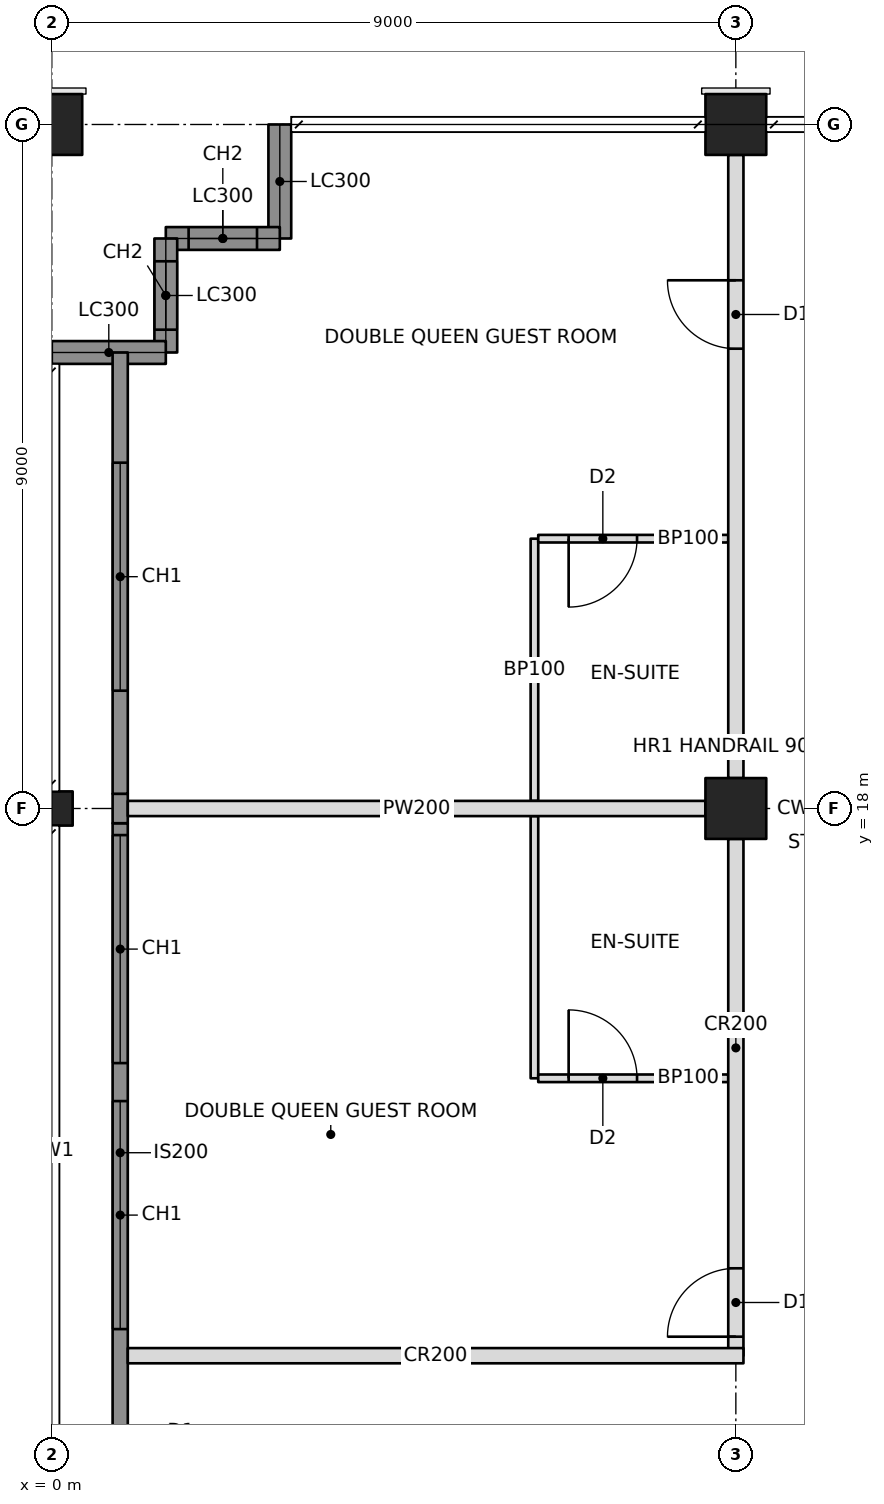
"""IFC4 building model, lengths in metres.
Left out: names, types, materials, properties, quantities, classifications, styles, units other than length and angle.
Written with IfcOpenShell. Run it as: python <this file> out.ifc"""

import sys

from ifc_helpers import new_model, si_unit, direction, frame, frame_2d, origin, origin_2d, place, context, subcontext, project, spatial, rectangle, hollow_rectangle, i_section, extrude, element, fill, save


model = new_model("IFC4")
c1 = context("Model", 3, precision=1e-05, world=origin(), true_north=direction((0.0, 1.0)))
c2 = subcontext(c1, "Body", "Model", "MODEL_VIEW")
j1 = project(units=[si_unit("LENGTHUNIT", "METRE"), si_unit("PLANEANGLEUNIT", "RADIAN")], contexts=[c1])
p1 = place(None, origin())
s1 = spatial("IfcSite", under=j1, at=p1, CompositionType="ELEMENT")
p2 = place(p1, origin())
s2 = spatial("IfcBuilding", under=s1, at=p2, CompositionType="ELEMENT")
p3 = place(p2, frame((0.0, 0.0, 184.2)))
s3 = spatial("IfcBuildingStorey", under=s2, at=p3, CompositionType="ELEMENT", Elevation=184.2)
p4 = place(p3, frame((0.0, 18.0, 0.0), z_axis=(0.0, 0.0, 1.0), x_axis=(0.0, 1.0, 0.0)))
e1 = element("IfcColumn", 1, at=p4, inside=s3, PredefinedType="COLUMN", context=c2, shape_type="SweptSolid", body=[
    extrude(i_section(OverallWidth=0.449, OverallDepth=0.549, WebThickness=0.072, FlangeThickness=0.115, at=origin_2d()), origin(), (0.0, 0.0, 1.0), 3.4),
])
p5 = place(p3, frame((0.0, 27.0, 0.0), z_axis=(0.0, 0.0, 1.0), x_axis=(0.0, 1.0, 0.0)))
e2 = element("IfcColumn", 2, at=p5, inside=s3, PredefinedType="COLUMN", context=c2, shape_type="SweptSolid", body=[
    extrude(hollow_rectangle(XDim=0.8, YDim=0.8, WallThickness=0.07, at=origin_2d()), origin(), (0.0, 0.0, 1.0), 3.4),
])
p6 = place(p3, frame((9.0, 18.0, 0.0), z_axis=(0.0, 0.0, 1.0), x_axis=(1.0, 0.0, 0.0)))
e3 = element("IfcColumn", 3, at=p6, inside=s3, PredefinedType="COLUMN", context=c2, shape_type="SweptSolid", body=[
    extrude(hollow_rectangle(XDim=0.8, YDim=0.8, WallThickness=0.06, at=origin_2d()), origin(), (0.0, 0.0, 1.0), 3.4),
])
p7 = place(p3, frame((9.0, 27.0, 0.0), z_axis=(0.0, 0.0, 1.0), x_axis=(1.0, 0.0, 0.0)))
e4 = element("IfcColumn", 4, at=p7, inside=s3, PredefinedType="COLUMN", context=c2, shape_type="SweptSolid", body=[
    extrude(hollow_rectangle(XDim=0.8, YDim=0.8, WallThickness=0.07, at=origin_2d()), origin(), (0.0, 0.0, 1.0), 3.4),
])
p8 = place(p3, frame((3.0, 27.0, 0.0), z_axis=(0.0, 0.0, 1.0), x_axis=(0.0, -1.0, 0.0)))
e5 = element("IfcWall", 5, at=p8, inside=s3, PredefinedType="SOLIDWALL", context=c2, shape_type="SweptSolid", body=[
    extrude(rectangle(XDim=1.5, YDim=0.3, at=frame_2d((0.75, 0.0))), origin(), (0.0, 0.0, 1.0), 2.42),
])
p9 = place(p3, frame((3.0, 25.5, 0.0), z_axis=(0.0, 0.0, 1.0), x_axis=(-1.0, 0.0, 0.0)))
e6 = element("IfcWall", 6, at=p9, inside=s3, PredefinedType="SOLIDWALL", context=c2, shape_type="SweptSolid", body=[
    extrude(rectangle(XDim=1.5, YDim=0.3, at=frame_2d((0.75, 0.0))), origin(), (0.0, 0.0, 1.0), 3.2),
])
p10 = place(p9, frame((0.3, 0.0, 0.6)))
e7 = element("IfcOpeningElement", 7, at=p10, cuts=e6, PredefinedType="OPENING", context=c2, shape_type="SweptSolid", body=[
    extrude(rectangle(XDim=0.9, YDim=2.2, at=frame_2d((0.45, 1.1))), frame((0.0, 0.16, 0.0), z_axis=(0.0, -1.0, 0.0), x_axis=(1.0, 0.0, 0.0)), (0.0, 0.0, 1.0), 0.32),
])
p11 = place(p3, frame((1.5, 25.5, 0.0), z_axis=(0.0, 0.0, 1.0), x_axis=(0.0, -1.0, 0.0)))
e8 = element("IfcWall", 8, at=p11, inside=s3, PredefinedType="SOLIDWALL", context=c2, shape_type="SweptSolid", body=[
    extrude(rectangle(XDim=1.5, YDim=0.3, at=frame_2d((0.75, 0.0))), origin(), (0.0, 0.0, 1.0), 3.2),
])
p12 = place(p11, frame((0.3, 0.0, 0.6)))
e9 = element("IfcOpeningElement", 9, at=p12, cuts=e8, PredefinedType="OPENING", context=c2, shape_type="SweptSolid", body=[
    extrude(rectangle(XDim=0.9, YDim=2.2, at=frame_2d((0.45, 1.1))), frame((0.0, 0.16, 0.0), z_axis=(0.0, -1.0, 0.0), x_axis=(1.0, 0.0, 0.0)), (0.0, 0.0, 1.0), 0.32),
])
p13 = place(p3, frame((1.5, 24.0, 0.0), z_axis=(0.0, 0.0, 1.0), x_axis=(-1.0, 0.0, 0.0)))
e10 = element("IfcWall", 10, at=p13, inside=s3, PredefinedType="SOLIDWALL", context=c2, shape_type="SweptSolid", body=[
    extrude(rectangle(XDim=1.5, YDim=0.3, at=frame_2d((0.75, 0.0))), origin(), (0.0, 0.0, 1.0), 2.42),
])
p14 = place(p3, frame((9.0, 10.8, 0.0), z_axis=(0.0, 0.0, 1.0), x_axis=(0.0, 1.0, 0.0)))
e11 = element("IfcWall", 11, at=p14, inside=s3, PredefinedType="PARTITIONING", context=c2, shape_type="SweptSolid", body=[
    extrude(rectangle(XDim=6.8, YDim=0.2, at=frame_2d((3.4, 0.0))), origin(), (0.0, 0.0, 1.0), 2.405),
])
p15 = place(p14, frame((0.25, 0.0, 0.0)))
e12 = element("IfcOpeningElement", 12, at=p15, cuts=e11, PredefinedType="OPENING", context=c2, shape_type="SweptSolid", body=[
    extrude(rectangle(XDim=0.9, YDim=2.1, at=frame_2d((0.45, 1.05))), frame((0.0, 0.11, 0.0), z_axis=(0.0, -1.0, 0.0), x_axis=(1.0, 0.0, 0.0)), (0.0, 0.0, 1.0), 0.22),
])
p16 = place(p3, frame((9.0, 18.4, 0.0), z_axis=(0.0, 0.0, 1.0), x_axis=(0.0, 1.0, 0.0)))
e13 = element("IfcWall", 13, at=p16, inside=s3, PredefinedType="PARTITIONING", context=c2, shape_type="SweptSolid", body=[
    extrude(rectangle(XDim=8.2, YDim=0.2, at=frame_2d((4.1, 0.0))), origin(), (0.0, 0.0, 1.0), 2.405),
])
p17 = place(p16, frame((5.65, 0.0, 0.0)))
e14 = element("IfcOpeningElement", 14, at=p17, cuts=e13, PredefinedType="OPENING", context=c2, shape_type="SweptSolid", body=[
    extrude(rectangle(XDim=0.9, YDim=2.1, at=frame_2d((0.45, 1.05))), frame((0.0, 0.11, 0.0), z_axis=(0.0, -1.0, 0.0), x_axis=(1.0, 0.0, 0.0)), (0.0, 0.0, 1.0), 0.22),
])
p18 = place(p3, frame((1.0, 10.8, 0.0), z_axis=(0.0, 0.0, 1.0), x_axis=(1.0, 0.0, 0.0)))
e15 = element("IfcWall", 15, at=p18, inside=s3, PredefinedType="PARTITIONING", context=c2, shape_type="SweptSolid", body=[
    extrude(rectangle(XDim=8.1, YDim=0.2, at=frame_2d((4.05, 0.0))), origin(), (0.0, 0.0, 1.0), 2.404),
])
p19 = place(p3, frame((8.6, 18.0, 0.0), z_axis=(0.0, 0.0, 1.0), x_axis=(-1.0, 0.0, 0.0)))
e16 = element("IfcWall", 16, at=p19, inside=s3, PredefinedType="PARTITIONING", context=c2, shape_type="SweptSolid", body=[
    extrude(rectangle(XDim=7.6, YDim=0.2, at=frame_2d((3.8, 0.0))), origin(), (0.0, 0.0, 1.0), 2.405),
])
p20 = place(p3, frame((6.35, 14.45, 0.0), z_axis=(0.0, 0.0, 1.0), x_axis=(0.0, 1.0, 0.0)))
e17 = element("IfcWall", 17, at=p20, inside=s3, PredefinedType="PARTITIONING", context=c2, shape_type="SweptSolid", body=[
    extrude(rectangle(XDim=3.45, YDim=0.1, at=frame_2d((1.725, 0.0))), origin(), (0.0, 0.0, 1.0), 2.404),
])
p21 = place(p3, frame((8.9, 14.45, 0.0), z_axis=(0.0, 0.0, 1.0), x_axis=(-1.0, 0.0, 0.0)))
e18 = element("IfcWall", 18, at=p21, inside=s3, PredefinedType="PARTITIONING", context=c2, shape_type="SweptSolid", body=[
    extrude(rectangle(XDim=2.5, YDim=0.1, at=frame_2d((1.25, 0.0))), origin(), (0.0, 0.0, 1.0), 2.404),
])
p22 = place(p21, frame((1.2, 0.0, 0.0)))
e19 = element("IfcOpeningElement", 19, at=p22, cuts=e18, PredefinedType="OPENING", context=c2, shape_type="SweptSolid", body=[
    extrude(rectangle(XDim=0.9, YDim=2.1, at=frame_2d((0.45, 1.05))), frame((0.0, 0.06, 0.0), z_axis=(0.0, -1.0, 0.0), x_axis=(1.0, 0.0, 0.0)), (0.0, 0.0, 1.0), 0.12),
])
p23 = place(p3, frame((6.35, 18.1, 0.0), z_axis=(0.0, 0.0, 1.0), x_axis=(0.0, 1.0, 0.0)))
e20 = element("IfcWall", 20, at=p23, inside=s3, PredefinedType="PARTITIONING", context=c2, shape_type="SweptSolid", body=[
    extrude(rectangle(XDim=3.45, YDim=0.1, at=frame_2d((1.725, 0.0))), origin(), (0.0, 0.0, 1.0), 2.404),
])
p24 = place(p3, frame((8.9, 21.55, 0.0), z_axis=(0.0, 0.0, 1.0), x_axis=(-1.0, 0.0, 0.0)))
e21 = element("IfcWall", 21, at=p24, inside=s3, PredefinedType="PARTITIONING", context=c2, shape_type="SweptSolid", body=[
    extrude(rectangle(XDim=2.5, YDim=0.1, at=frame_2d((1.25, 0.0))), origin(), (0.0, 0.0, 1.0), 2.404),
])
p25 = place(p24, frame((1.2, 0.0, 0.0)))
e22 = element("IfcOpeningElement", 22, at=p25, cuts=e21, PredefinedType="OPENING", context=c2, shape_type="SweptSolid", body=[
    extrude(rectangle(XDim=0.9, YDim=2.1, at=frame_2d((0.45, 1.05))), frame((0.0, 0.06, 0.0), z_axis=(0.0, -1.0, 0.0), x_axis=(1.0, 0.0, 0.0)), (0.0, 0.0, 1.0), 0.12),
])
p26 = place(p3, frame((0.9, 9.135, 0.0), z_axis=(0.0, 0.0, 1.0), x_axis=(0.0, 1.0, 0.0)))
e23 = element("IfcWall", 23, at=p26, inside=s3, PredefinedType="SOLIDWALL", context=c2, shape_type="SweptSolid", body=[
    extrude(rectangle(XDim=8.671, YDim=0.2, at=frame_2d((4.335, 0.0))), origin(), (0.0, 0.0, 1.0), 3.2),
])
p27 = place(p26, frame((2.015, 0.0, 0.6)))
e24 = element("IfcOpeningElement", 24, at=p27, cuts=e23, PredefinedType="OPENING", context=c2, shape_type="SweptSolid", body=[
    extrude(rectangle(XDim=3.0, YDim=2.2, at=frame_2d((1.5, 1.1))), frame((0.0, 0.11, 0.0), z_axis=(0.0, -1.0, 0.0), x_axis=(1.0, 0.0, 0.0)), (0.0, 0.0, 1.0), 0.22),
])
p28 = place(p26, frame((5.515, 0.0, 0.6)))
e25 = element("IfcOpeningElement", 25, at=p28, cuts=e23, PredefinedType="OPENING", context=c2, shape_type="SweptSolid", body=[
    extrude(rectangle(XDim=3.0, YDim=2.2, at=frame_2d((1.5, 1.1))), frame((0.0, 0.11, 0.0), z_axis=(0.0, -1.0, 0.0), x_axis=(1.0, 0.0, 0.0)), (0.0, 0.0, 1.0), 0.22),
])
p29 = place(p3, frame((0.9, 17.806, 0.0), z_axis=(0.0, 0.0, 1.0), x_axis=(0.0, 1.0, 0.0)))
e26 = element("IfcWall", 26, at=p29, inside=s3, PredefinedType="SOLIDWALL", context=c2, shape_type="SweptSolid", body=[
    extrude(rectangle(XDim=0.388, YDim=0.2, at=frame_2d((0.194, 0.0))), origin(), (0.0, 0.0, 1.0), 2.404),
])
p30 = place(p3, frame((0.9, 18.194, 0.0), z_axis=(0.0, 0.0, 1.0), x_axis=(0.0, 1.0, 0.0)))
e27 = element("IfcWall", 27, at=p30, inside=s3, PredefinedType="SOLIDWALL", context=c2, shape_type="SweptSolid", body=[
    extrude(rectangle(XDim=5.806, YDim=0.2, at=frame_2d((2.903, 0.0))), origin(), (0.0, 0.0, 1.0), 3.2),
])
p31 = place(p30, frame((1.356, 0.0, 0.6)))
e28 = element("IfcOpeningElement", 28, at=p31, cuts=e27, PredefinedType="OPENING", context=c2, shape_type="SweptSolid", body=[
    extrude(rectangle(XDim=3.0, YDim=2.2, at=frame_2d((1.5, 1.1))), frame((0.0, 0.11, 0.0), z_axis=(0.0, -1.0, 0.0), x_axis=(1.0, 0.0, 0.0)), (0.0, 0.0, 1.0), 0.22),
])
p32 = place(p10, origin())
e29 = element("IfcWindow", 29, at=p32, inside=s3, PartitioningType="SINGLE_PANEL", PredefinedType="WINDOW", context=c2, shape_type="SweptSolid", body=[
    extrude(rectangle(XDim=0.9, YDim=2.2, at=frame_2d((0.45, 1.1))), frame((0.0, 0.03, 0.0), z_axis=(0.0, -1.0, 0.0), x_axis=(1.0, 0.0, 0.0)), (0.0, 0.0, 1.0), 0.06),
])
fill(e7, e29)
p33 = place(p12, origin())
e30 = element("IfcWindow", 30, at=p33, inside=s3, PartitioningType="SINGLE_PANEL", PredefinedType="WINDOW", context=c2, shape_type="SweptSolid", body=[
    extrude(rectangle(XDim=0.9, YDim=2.2, at=frame_2d((0.45, 1.1))), frame((0.0, 0.03, 0.0), z_axis=(0.0, -1.0, 0.0), x_axis=(1.0, 0.0, 0.0)), (0.0, 0.0, 1.0), 0.06),
])
fill(e9, e30)
p34 = place(p27, origin())
e31 = element("IfcWindow", 31, at=p34, inside=s3, PartitioningType="TRIPLE_PANEL_VERTICAL", PredefinedType="WINDOW", context=c2, shape_type="SweptSolid", body=[
    extrude(rectangle(XDim=3.0, YDim=2.2, at=frame_2d((1.5, 1.1))), frame((0.0, 0.03, 0.0), z_axis=(0.0, -1.0, 0.0), x_axis=(1.0, 0.0, 0.0)), (0.0, 0.0, 1.0), 0.06),
])
fill(e24, e31)
p35 = place(p28, origin())
e32 = element("IfcWindow", 32, at=p35, inside=s3, PartitioningType="TRIPLE_PANEL_VERTICAL", PredefinedType="WINDOW", context=c2, shape_type="SweptSolid", body=[
    extrude(rectangle(XDim=3.0, YDim=2.2, at=frame_2d((1.5, 1.1))), frame((0.0, 0.03, 0.0), z_axis=(0.0, -1.0, 0.0), x_axis=(1.0, 0.0, 0.0)), (0.0, 0.0, 1.0), 0.06),
])
fill(e25, e32)
p36 = place(p31, origin())
e33 = element("IfcWindow", 33, at=p36, inside=s3, PartitioningType="TRIPLE_PANEL_VERTICAL", PredefinedType="WINDOW", context=c2, shape_type="SweptSolid", body=[
    extrude(rectangle(XDim=3.0, YDim=2.2, at=frame_2d((1.5, 1.1))), frame((0.0, 0.03, 0.0), z_axis=(0.0, -1.0, 0.0), x_axis=(1.0, 0.0, 0.0)), (0.0, 0.0, 1.0), 0.06),
])
fill(e28, e33)
p37 = place(p22, frame((0.9, 0.0, 0.0), z_axis=(0.0, 0.0, 1.0), x_axis=(-1.0, 0.0, 0.0)))
e34 = element("IfcDoor", 34, at=p37, inside=s3, OperationType="SINGLE_SWING_LEFT", PredefinedType="DOOR", context=c2, shape_type="SweptSolid", body=[
    extrude(rectangle(XDim=0.9, YDim=2.1, at=frame_2d((0.45, 1.05))), frame((0.0, 0.025, 0.0), z_axis=(0.0, -1.0, 0.0), x_axis=(1.0, 0.0, 0.0)), (0.0, 0.0, 1.0), 0.05),
])
fill(e19, e34)
p38 = place(p15, origin())
e35 = element("IfcDoor", 35, at=p38, inside=s3, OperationType="SINGLE_SWING_LEFT", PredefinedType="DOOR", context=c2, shape_type="SweptSolid", body=[
    extrude(rectangle(XDim=0.9, YDim=2.1, at=frame_2d((0.45, 1.05))), frame((0.0, 0.025, 0.0), z_axis=(0.0, -1.0, 0.0), x_axis=(1.0, 0.0, 0.0)), (0.0, 0.0, 1.0), 0.05),
])
fill(e12, e35)
p39 = place(p25, origin())
e36 = element("IfcDoor", 36, at=p39, inside=s3, OperationType="SINGLE_SWING_RIGHT", PredefinedType="DOOR", context=c2, shape_type="SweptSolid", body=[
    extrude(rectangle(XDim=0.9, YDim=2.1, at=frame_2d((0.45, 1.05))), frame((0.0, 0.025, 0.0), z_axis=(0.0, -1.0, 0.0), x_axis=(1.0, 0.0, 0.0)), (0.0, 0.0, 1.0), 0.05),
])
fill(e22, e36)
p40 = place(p17, origin())
e37 = element("IfcDoor", 37, at=p40, inside=s3, OperationType="SINGLE_SWING_RIGHT", PredefinedType="DOOR", context=c2, shape_type="SweptSolid", body=[
    extrude(rectangle(XDim=0.9, YDim=2.1, at=frame_2d((0.45, 1.05))), frame((0.0, 0.025, 0.0), z_axis=(0.0, -1.0, 0.0), x_axis=(1.0, 0.0, 0.0)), (0.0, 0.0, 1.0), 0.05),
])
fill(e14, e37)
save(model, sys.argv[1])
